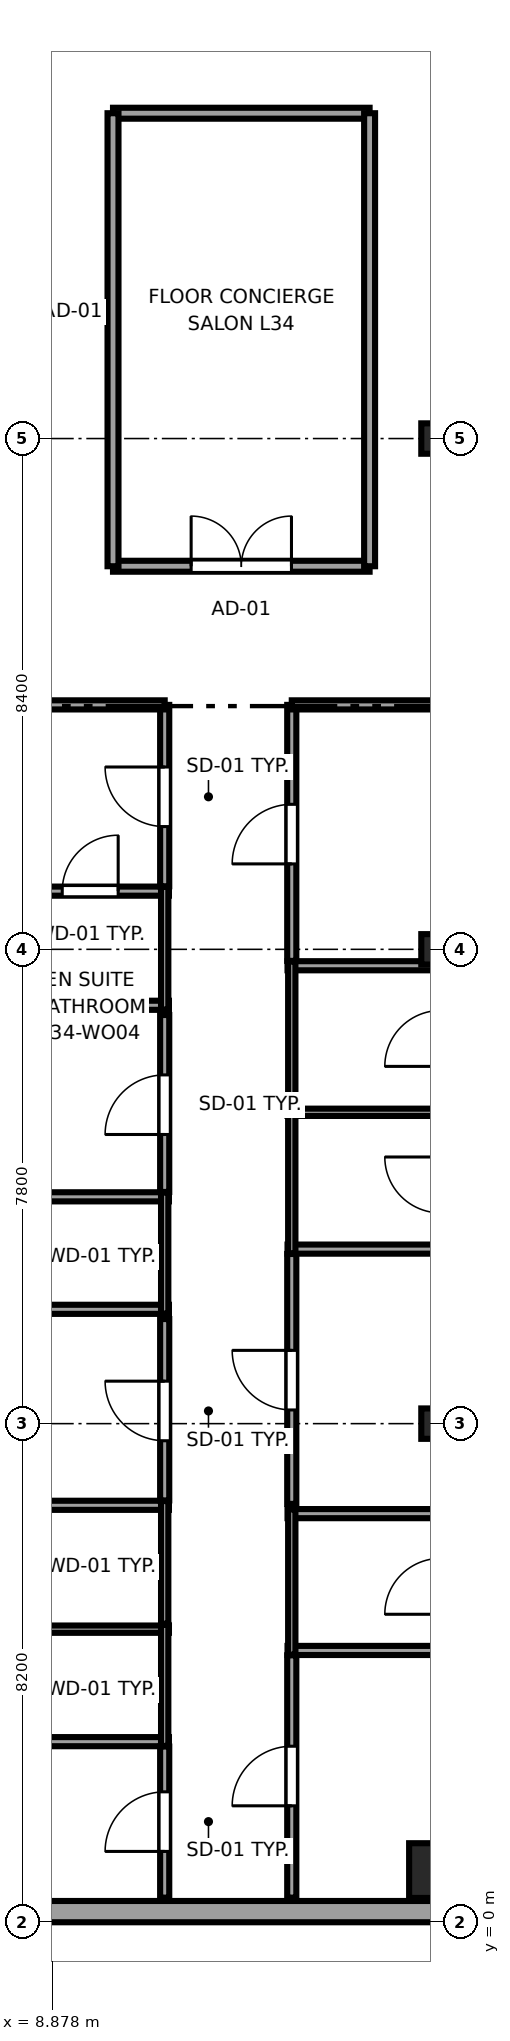
"""IFC4 building model, lengths in metres.
Left out: names, types, materials, properties, quantities, classifications, styles, units other than length and angle.
Written with IfcOpenShell. Run it as: python <this file> out.ifc"""

import sys

from ifc_helpers import new_model, si_unit, direction, frame, frame_2d, origin, origin_2d, place, context, subcontext, project, spatial, rectangle, i_section, extrude, source, transform, mapped, element, fill, save


model = new_model("IFC4")
c1 = context("Model", 3, precision=1e-05, world=origin(), true_north=direction((0.0, 1.0)))
c2 = subcontext(c1, "Body", "Model", "MODEL_VIEW")
j1 = project(units=[si_unit("LENGTHUNIT", "METRE"), si_unit("PLANEANGLEUNIT", "RADIAN")], contexts=[c1])
p1 = place(None, origin())
s1 = spatial("IfcSite", under=j1, at=p1, CompositionType="ELEMENT")
p2 = place(p1, origin())
s2 = spatial("IfcBuilding", under=s1, at=p2, CompositionType="ELEMENT")
p3 = place(p2, frame((0.0, 0.0, 132.85)))
s3 = spatial("IfcBuildingStorey", under=s2, at=p3, CompositionType="ELEMENT", Elevation=132.85)
m1 = source(origin(), c2, "Body", "SweptSolid", [
    extrude(rectangle(XDim=0.9, YDim=0.9, at=origin_2d()), origin(), (0.0, 0.0, 1.0), 3.55),
])
p4 = place(p3, frame((15.2, 0.85, 0.0), z_axis=(0.0, 0.0, 1.0), x_axis=(1.0, 0.0, 0.0)))
e1 = element("IfcColumn", 1, at=p4, inside=s3, PredefinedType="COLUMN", context=c2, shape_type="MappedRepresentation", body=[
    mapped(m1, transform((0.0, 0.0, 0.0), x_axis=(1.0, 0.0, 0.0), y_axis=(0.0, 1.0, 0.0), z_axis=(0.0, 0.0, 1.0), scale=1.0)),
])
m2 = source(origin(), c2, "Body", "SweptSolid", [
    extrude(i_section(OverallWidth=0.5, OverallDepth=0.5, WebThickness=0.022, FlangeThickness=0.034, at=origin_2d()), origin(), (0.0, 0.0, 1.0), 3.55),
])
for number, where, z_axis, x_axis in (
    (2, (15.2, 8.2, 0.0), (0.0, 0.0, 1.0), (1.0, 0.0, 0.0)),
    (3, (15.2, 16.0, 0.0), (0.0, 0.0, 1.0), (1.0, 0.0, 0.0)),
    (4, (15.2, 24.4, 0.0), (0.0, 0.0, 1.0), (1.0, 0.0, 0.0)),
):
    element("IfcColumn", number, at=place(p3, frame(where, z_axis=z_axis, x_axis=x_axis)), inside=s3, PredefinedType="COLUMN", context=c2, shape_type="MappedRepresentation", body=[
        mapped(m2, transform((0.0, 0.0, 0.0), x_axis=(1.0, 0.0, 0.0), y_axis=(0.0, 1.0, 0.0), z_axis=(0.0, 0.0, 1.0), scale=1.0)),
    ])
p5 = place(p3, frame((4.617, 0.175, 0.0), z_axis=(0.0, 0.0, 1.0), x_axis=(1.0, 0.0, 0.0)))
e5 = element("IfcWall", 5, at=p5, inside=s3, PredefinedType="SOLIDWALL", context=c2, shape_type="SweptSolid", body=[
    extrude(rectangle(XDim=18.008, YDim=0.35, at=frame_2d((9.004, 0.0))), origin(), (0.0, 0.0, 1.0), 3.37),
])
p6 = place(p5, frame((14.332, 0.0, 0.68)))
e6 = element("IfcOpeningElement", 6, at=p6, cuts=e5, PredefinedType="OPENING", context=c2, shape_type="SweptSolid", body=[
    extrude(rectangle(XDim=1.95, YDim=1.82, at=frame_2d((0.975, 0.91))), frame((0.0, 0.185, 0.0), z_axis=(0.0, -1.0, 0.0), x_axis=(1.0, 0.0, 0.0)), (0.0, 0.0, 1.0), 0.37),
])
p7 = place(p5, frame((2.391, 0.0, 0.62)))
e7 = element("IfcOpeningElement", 7, at=p7, cuts=e5, PredefinedType="OPENING", context=c2, shape_type="SweptSolid", body=[
    extrude(rectangle(XDim=1.5, YDim=1.55, at=frame_2d((0.75, 0.775))), frame((0.0, 0.185, 0.0), z_axis=(0.0, -1.0, 0.0), x_axis=(1.0, 0.0, 0.0)), (0.0, 0.0, 1.0), 0.37),
])
p8 = place(p3, frame((8.21, 2.97, 0.0), z_axis=(0.0, 0.0, 1.0), x_axis=(1.0, 0.0, 0.0)))
e8 = element("IfcWall", 8, at=p8, inside=s3, PredefinedType="PARTITIONING", context=c2, shape_type="SweptSolid", body=[
    extrude(rectangle(XDim=2.59, YDim=0.15, at=frame_2d((1.295, 0.0))), origin(), (0.0, 0.0, 1.0), 3.37),
])
p9 = place(p3, frame((8.21, 4.82, 0.0), z_axis=(0.0, 0.0, 1.0), x_axis=(1.0, 0.0, 0.0)))
e9 = element("IfcWall", 9, at=p9, inside=s3, PredefinedType="PLUMBINGWALL", context=c2, shape_type="SweptSolid", body=[
    extrude(rectangle(XDim=2.59, YDim=0.12, at=frame_2d((1.295, 0.0))), origin(), (0.0, 0.0, 1.0), 3.37),
])
p10 = place(p3, frame((10.73, 2.9, 0.0), z_axis=(0.0, 0.0, 1.0), x_axis=(0.0, 1.0, 0.0)))
e10 = element("IfcWall", 10, at=p10, inside=s3, PredefinedType="PLUMBINGWALL", context=c2, shape_type="SweptSolid", body=[
    extrude(rectangle(XDim=1.99, YDim=0.12, at=frame_2d((0.995, 0.0))), origin(), (0.0, 0.0, 1.0), 3.37),
])
p11 = place(p3, frame((8.21, 6.857, 0.0), z_axis=(0.0, 0.0, 1.0), x_axis=(1.0, 0.0, 0.0)))
e11 = element("IfcWall", 11, at=p11, inside=s3, PredefinedType="PARTITIONING", context=c2, shape_type="SweptSolid", body=[
    extrude(rectangle(XDim=2.59, YDim=0.15, at=frame_2d((1.295, 0.0))), origin(), (0.0, 0.0, 1.0), 3.37),
])
p12 = place(p3, frame((10.73, 4.91, 0.0), z_axis=(0.0, 0.0, 1.0), x_axis=(0.0, 1.0, 0.0)))
e12 = element("IfcWall", 12, at=p12, inside=s3, PredefinedType="PLUMBINGWALL", context=c2, shape_type="SweptSolid", body=[
    extrude(rectangle(XDim=2.017, YDim=0.12, at=frame_2d((1.009, 0.0))), origin(), (0.0, 0.0, 1.0), 3.37),
])
p13 = place(p3, frame((0.405, 10.08, 0.0), z_axis=(0.0, 0.0, 1.0), x_axis=(1.0, 0.0, 0.0)))
e13 = element("IfcWall", 13, at=p13, inside=s3, PredefinedType="PARTITIONING", context=c2, shape_type="SweptSolid", body=[
    extrude(rectangle(XDim=10.395, YDim=0.15, at=frame_2d((5.198, 0.0))), origin(), (0.0, 0.0, 1.0), 3.37),
])
p14 = place(p3, frame((8.21, 11.93, 0.0), z_axis=(0.0, 0.0, 1.0), x_axis=(1.0, 0.0, 0.0)))
e14 = element("IfcWall", 14, at=p14, inside=s3, PredefinedType="PARTITIONING", context=c2, shape_type="SweptSolid", body=[
    extrude(rectangle(XDim=2.59, YDim=0.15, at=frame_2d((1.295, 0.0))), origin(), (0.0, 0.0, 1.0), 3.37),
])
p15 = place(p3, frame((10.73, 10.01, 0.0), z_axis=(0.0, 0.0, 1.0), x_axis=(0.0, 1.0, 0.0)))
e15 = element("IfcWall", 15, at=p15, inside=s3, PredefinedType="PLUMBINGWALL", context=c2, shape_type="SweptSolid", body=[
    extrude(rectangle(XDim=1.99, YDim=0.12, at=frame_2d((0.995, 0.0))), origin(), (0.0, 0.0, 1.0), 3.37),
])
p16 = place(p3, frame((0.405, 15.08, 0.0), z_axis=(0.0, 0.0, 1.0), x_axis=(1.0, 0.0, 0.0)))
e16 = element("IfcWall", 16, at=p16, inside=s3, PredefinedType="PARTITIONING", context=c2, shape_type="SweptSolid", body=[
    extrude(rectangle(XDim=10.395, YDim=0.15, at=frame_2d((5.198, 0.0))), origin(), (0.0, 0.0, 1.0), 3.37),
])
p17 = place(p3, frame((8.21, 16.957, 0.0), z_axis=(0.0, 0.0, 1.0), x_axis=(1.0, 0.0, 0.0)))
e17 = element("IfcWall", 17, at=p17, inside=s3, PredefinedType="PARTITIONING", context=c2, shape_type="SweptSolid", body=[
    extrude(rectangle(XDim=2.59, YDim=0.15, at=frame_2d((1.295, 0.0))), origin(), (0.0, 0.0, 1.0), 3.37),
])
p18 = place(p17, frame((0.835, 0.0, 0.0)))
e18 = element("IfcOpeningElement", 18, at=p18, cuts=e17, PredefinedType="OPENING", context=c2, shape_type="SweptSolid", body=[
    extrude(rectangle(XDim=0.92, YDim=2.01, at=frame_2d((0.46, 1.005))), frame((0.0, 0.085, 0.0), z_axis=(0.0, -1.0, 0.0), x_axis=(1.0, 0.0, 0.0)), (0.0, 0.0, 1.0), 0.17),
])
p19 = place(p3, frame((10.73, 15.01, 0.0), z_axis=(0.0, 0.0, 1.0), x_axis=(0.0, 1.0, 0.0)))
e19 = element("IfcWall", 19, at=p19, inside=s3, PredefinedType="PLUMBINGWALL", context=c2, shape_type="SweptSolid", body=[
    extrude(rectangle(XDim=2.017, YDim=0.12, at=frame_2d((1.009, 0.0))), origin(), (0.0, 0.0, 1.0), 3.37),
])
for number, where, z_axis, x_axis in (
    (20, (12.75, 4.47, 0.0), (0.0, 0.0, 1.0), (1.0, 0.0, 0.0)),
    (21, (12.75, 6.72, 0.0), (0.0, 0.0, 1.0), (1.0, 0.0, 0.0)),
):
    element("IfcWall", number, at=place(p3, frame(where, z_axis=z_axis, x_axis=x_axis)), inside=s3, PredefinedType="PARTITIONING", context=c2, shape_type="SweptSolid", body=[
        extrude(rectangle(XDim=2.59, YDim=0.15, at=frame_2d((1.295, 0.0))), origin(), (0.0, 0.0, 1.0), 3.37),
    ])
p20 = place(p3, frame((12.82, 4.4, 0.0), z_axis=(0.0, 0.0, 1.0), x_axis=(0.0, 1.0, 0.0)))
e22 = element("IfcWall", 22, at=p20, inside=s3, PredefinedType="PLUMBINGWALL", context=c2, shape_type="SweptSolid", body=[
    extrude(rectangle(XDim=2.39, YDim=0.12, at=frame_2d((1.195, 0.0))), origin(), (0.0, 0.0, 1.0), 3.37),
])
p21 = place(p3, frame((12.75, 11.07, 0.0), z_axis=(0.0, 0.0, 1.0), x_axis=(1.0, 0.0, 0.0)))
e23 = element("IfcWall", 23, at=p21, inside=s3, PredefinedType="PARTITIONING", context=c2, shape_type="SweptSolid", body=[
    extrude(rectangle(XDim=2.59, YDim=0.15, at=frame_2d((1.295, 0.0))), origin(), (0.0, 0.0, 1.0), 3.37),
])
p22 = place(p3, frame((12.75, 13.32, 0.0), z_axis=(0.0, 0.0, 1.0), x_axis=(1.0, 0.0, 0.0)))
e24 = element("IfcWall", 24, at=p22, inside=s3, PredefinedType="PLUMBINGWALL", context=c2, shape_type="SweptSolid", body=[
    extrude(rectangle(XDim=2.59, YDim=0.12, at=frame_2d((1.295, 0.0))), origin(), (0.0, 0.0, 1.0), 3.37),
])
p23 = place(p3, frame((12.82, 11.0, 0.0), z_axis=(0.0, 0.0, 1.0), x_axis=(0.0, 1.0, 0.0)))
e25 = element("IfcWall", 25, at=p23, inside=s3, PredefinedType="PLUMBINGWALL", context=c2, shape_type="SweptSolid", body=[
    extrude(rectangle(XDim=2.39, YDim=0.12, at=frame_2d((1.195, 0.0))), origin(), (0.0, 0.0, 1.0), 3.37),
])
p24 = place(p3, frame((12.75, 15.73, 0.0), z_axis=(0.0, 0.0, 1.0), x_axis=(1.0, 0.0, 0.0)))
e26 = element("IfcWall", 26, at=p24, inside=s3, PredefinedType="PARTITIONING", context=c2, shape_type="SweptSolid", body=[
    extrude(rectangle(XDim=2.59, YDim=0.15, at=frame_2d((1.295, 0.0))), origin(), (0.0, 0.0, 1.0), 3.37),
])
p25 = place(p3, frame((12.82, 13.41, 0.0), z_axis=(0.0, 0.0, 1.0), x_axis=(0.0, 1.0, 0.0)))
e27 = element("IfcWall", 27, at=p25, inside=s3, PredefinedType="PLUMBINGWALL", context=c2, shape_type="SweptSolid", body=[
    extrude(rectangle(XDim=2.39, YDim=0.12, at=frame_2d((1.195, 0.0))), origin(), (0.0, 0.0, 1.0), 3.37),
])
p26 = place(p3, frame((10.73, 0.405, 0.0), z_axis=(0.0, 0.0, 1.0), x_axis=(0.0, 1.0, 0.0)))
e28 = element("IfcWall", 28, at=p26, inside=s3, PredefinedType="PARTITIONING", context=c2, shape_type="SweptSolid", body=[
    extrude(rectangle(XDim=2.485, YDim=0.15, at=frame_2d((1.242, 0.0))), origin(), (0.0, 0.0, 1.0), 3.37),
])
p27 = place(p26, frame((0.76, 0.0, 0.0)))
e29 = element("IfcOpeningElement", 29, at=p27, cuts=e28, PredefinedType="OPENING", context=c2, shape_type="SweptSolid", body=[
    extrude(rectangle(XDim=0.98, YDim=2.12, at=frame_2d((0.49, 1.06))), frame((0.0, 0.085, 0.0), z_axis=(0.0, -1.0, 0.0), x_axis=(1.0, 0.0, 0.0)), (0.0, 0.0, 1.0), 0.17),
])
p28 = place(p3, frame((10.73, 6.937, 0.0), z_axis=(0.0, 0.0, 1.0), x_axis=(0.0, 1.0, 0.0)))
e30 = element("IfcWall", 30, at=p28, inside=s3, PredefinedType="PARTITIONING", context=c2, shape_type="SweptSolid", body=[
    extrude(rectangle(XDim=2.983, YDim=0.15, at=frame_2d((1.491, 0.0))), origin(), (0.0, 0.0, 1.0), 3.37),
])
p29 = place(p28, frame((0.981, 0.0, 0.0)))
e31 = element("IfcOpeningElement", 31, at=p29, cuts=e30, PredefinedType="OPENING", context=c2, shape_type="SweptSolid", body=[
    extrude(rectangle(XDim=0.98, YDim=2.12, at=frame_2d((0.49, 1.06))), frame((0.0, 0.085, 0.0), z_axis=(0.0, -1.0, 0.0), x_axis=(1.0, 0.0, 0.0)), (0.0, 0.0, 1.0), 0.17),
])
p30 = place(p3, frame((10.73, 12.01, 0.0), z_axis=(0.0, 0.0, 1.0), x_axis=(0.0, 1.0, 0.0)))
e32 = element("IfcWall", 32, at=p30, inside=s3, PredefinedType="PARTITIONING", context=c2, shape_type="SweptSolid", body=[
    extrude(rectangle(XDim=2.91, YDim=0.15, at=frame_2d((1.455, 0.0))), origin(), (0.0, 0.0, 1.0), 3.37),
])
p31 = place(p30, frame((0.945, 0.0, 0.0)))
e33 = element("IfcOpeningElement", 33, at=p31, cuts=e32, PredefinedType="OPENING", context=c2, shape_type="SweptSolid", body=[
    extrude(rectangle(XDim=0.98, YDim=2.12, at=frame_2d((0.49, 1.06))), frame((0.0, 0.085, 0.0), z_axis=(0.0, -1.0, 0.0), x_axis=(1.0, 0.0, 0.0)), (0.0, 0.0, 1.0), 0.17),
])
p32 = place(p3, frame((10.73, 17.037, 0.0), z_axis=(0.0, 0.0, 1.0), x_axis=(0.0, 1.0, 0.0)))
e34 = element("IfcWall", 34, at=p32, inside=s3, PredefinedType="PARTITIONING", context=c2, shape_type="SweptSolid", body=[
    extrude(rectangle(XDim=2.983, YDim=0.15, at=frame_2d((1.491, 0.0))), origin(), (0.0, 0.0, 1.0), 3.37),
])
p33 = place(p32, frame((0.981, 0.0, 0.0)))
e35 = element("IfcOpeningElement", 35, at=p33, cuts=e34, PredefinedType="OPENING", context=c2, shape_type="SweptSolid", body=[
    extrude(rectangle(XDim=0.98, YDim=2.12, at=frame_2d((0.49, 1.06))), frame((0.0, 0.085, 0.0), z_axis=(0.0, -1.0, 0.0), x_axis=(1.0, 0.0, 0.0)), (0.0, 0.0, 1.0), 0.17),
])
p34 = place(p3, frame((0.405, 20.02, 0.0), z_axis=(0.0, 0.0, 1.0), x_axis=(1.0, 0.0, 0.0)))
e36 = element("IfcWall", 36, at=p34, inside=s3, PredefinedType="PARTITIONING", context=c2, shape_type="SweptSolid", body=[
    extrude(rectangle(XDim=10.325, YDim=0.15, at=frame_2d((5.163, 0.0))), origin(), (0.0, 0.0, 1.0), 3.37),
])
p35 = place(p3, frame((12.82, 0.405, 0.0), z_axis=(0.0, 0.0, 1.0), x_axis=(0.0, 1.0, 0.0)))
e37 = element("IfcWall", 37, at=p35, inside=s3, PredefinedType="PARTITIONING", context=c2, shape_type="SweptSolid", body=[
    extrude(rectangle(XDim=3.985, YDim=0.15, at=frame_2d((1.992, 0.0))), origin(), (0.0, 0.0, 1.0), 3.37),
])
p36 = place(p35, frame((1.51, 0.0, 0.0)))
e38 = element("IfcOpeningElement", 38, at=p36, cuts=e37, PredefinedType="OPENING", context=c2, shape_type="SweptSolid", body=[
    extrude(rectangle(XDim=0.98, YDim=2.12, at=frame_2d((0.49, 1.06))), frame((0.0, 0.085, 0.0), z_axis=(0.0, -1.0, 0.0), x_axis=(1.0, 0.0, 0.0)), (0.0, 0.0, 1.0), 0.17),
])
p37 = place(p3, frame((12.82, 6.88, 0.0), z_axis=(0.0, 0.0, 1.0), x_axis=(0.0, 1.0, 0.0)))
e39 = element("IfcWall", 39, at=p37, inside=s3, PredefinedType="PARTITIONING", context=c2, shape_type="SweptSolid", body=[
    extrude(rectangle(XDim=4.11, YDim=0.15, at=frame_2d((2.055, 0.0))), origin(), (0.0, 0.0, 1.0), 3.37),
])
p38 = place(p37, frame((1.545, 0.0, 0.0)))
e40 = element("IfcOpeningElement", 40, at=p38, cuts=e39, PredefinedType="OPENING", context=c2, shape_type="SweptSolid", body=[
    extrude(rectangle(XDim=0.98, YDim=2.12, at=frame_2d((0.49, 1.06))), frame((0.0, 0.085, 0.0), z_axis=(0.0, -1.0, 0.0), x_axis=(1.0, 0.0, 0.0)), (0.0, 0.0, 1.0), 0.17),
])
p39 = place(p3, frame((12.82, 15.81, 0.0), z_axis=(0.0, 0.0, 1.0), x_axis=(0.0, 1.0, 0.0)))
e41 = element("IfcWall", 41, at=p39, inside=s3, PredefinedType="PARTITIONING", context=c2, shape_type="SweptSolid", body=[
    extrude(rectangle(XDim=4.21, YDim=0.15, at=frame_2d((2.105, 0.0))), origin(), (0.0, 0.0, 1.0), 3.37),
])
p40 = place(p39, frame((1.595, 0.0, 0.0)))
e42 = element("IfcOpeningElement", 42, at=p40, cuts=e41, PredefinedType="OPENING", context=c2, shape_type="SweptSolid", body=[
    extrude(rectangle(XDim=0.98, YDim=2.12, at=frame_2d((0.49, 1.06))), frame((0.0, 0.085, 0.0), z_axis=(0.0, -1.0, 0.0), x_axis=(1.0, 0.0, 0.0)), (0.0, 0.0, 1.0), 0.17),
])
p41 = place(p3, frame((12.82, 20.02, 0.0), z_axis=(0.0, 0.0, 1.0), x_axis=(1.0, 0.0, 0.0)))
e43 = element("IfcWall", 43, at=p41, inside=s3, PredefinedType="PARTITIONING", context=c2, shape_type="SweptSolid", body=[
    extrude(rectangle(XDim=9.53, YDim=0.15, at=frame_2d((4.765, 0.0))), origin(), (0.0, 0.0, 1.0), 2.954),
])
p42 = place(p3, frame((9.88, 22.3, 0.0), z_axis=(0.0, 0.0, 1.0), x_axis=(1.0, 0.0, 0.0)))
e44 = element("IfcWall", 44, at=p42, inside=s3, PredefinedType="PARTITIONING", context=c2, shape_type="SweptSolid", body=[
    extrude(rectangle(XDim=4.22, YDim=0.18, at=frame_2d((2.11, 0.0))), origin(), (0.0, 0.0, 1.0), 3.37),
])
p43 = place(p42, frame((1.285, 0.0, 0.0)))
e45 = element("IfcOpeningElement", 45, at=p43, cuts=e44, PredefinedType="OPENING", context=c2, shape_type="SweptSolid", body=[
    extrude(rectangle(XDim=1.65, YDim=2.15, at=frame_2d((0.825, 1.075))), frame((0.0, 0.1, 0.0), z_axis=(0.0, -1.0, 0.0), x_axis=(1.0, 0.0, 0.0)), (0.0, 0.0, 1.0), 0.2),
])
p44 = place(p3, frame((9.88, 29.75, 0.0), z_axis=(0.0, 0.0, 1.0), x_axis=(1.0, 0.0, 0.0)))
e46 = element("IfcWall", 46, at=p44, inside=s3, PredefinedType="PARTITIONING", context=c2, shape_type="SweptSolid", body=[
    extrude(rectangle(XDim=4.22, YDim=0.18, at=frame_2d((2.11, 0.0))), origin(), (0.0, 0.0, 1.0), 3.37),
])
for number, where, z_axis, x_axis in (
    (47, (9.88, 22.3, 0.0), (0.0, 0.0, 1.0), (0.0, 1.0, 0.0)),
    (48, (14.1, 22.3, 0.0), (0.0, 0.0, 1.0), (0.0, 1.0, 0.0)),
):
    element("IfcWall", number, at=place(p3, frame(where, z_axis=z_axis, x_axis=x_axis)), inside=s3, PredefinedType="PARTITIONING", context=c2, shape_type="SweptSolid", body=[
        extrude(rectangle(XDim=7.45, YDim=0.18, at=frame_2d((3.725, 0.0))), origin(), (0.0, 0.0, 1.0), 3.37),
    ])
m3 = source(origin(), c2, "Body", "SweptSolid", [
    extrude(rectangle(XDim=0.92, YDim=2.01, at=frame_2d((0.46, 1.005))), frame((0.0, 0.025, 0.0), z_axis=(0.0, -1.0, 0.0), x_axis=(1.0, 0.0, 0.0)), (0.0, 0.0, 1.0), 0.05),
])
p45 = place(p18, origin())
e49 = element("IfcDoor", 49, at=p45, inside=s3, OperationType="SINGLE_SWING_RIGHT", PredefinedType="DOOR", context=c2, shape_type="MappedRepresentation", body=[
    mapped(m3, transform((0.0, 0.0, 0.0), x_axis=(1.0, 0.0, 0.0), y_axis=(0.0, 1.0, 0.0), z_axis=(0.0, 0.0, 1.0), scale=1.0)),
])
fill(e18, e49)
m4 = source(origin(), c2, "Body", "SweptSolid", [
    extrude(rectangle(XDim=0.98, YDim=2.12, at=frame_2d((0.49, 1.06))), frame((0.0, 0.025, 0.0), z_axis=(0.0, -1.0, 0.0), x_axis=(1.0, 0.0, 0.0)), (0.0, 0.0, 1.0), 0.05),
])
p46 = place(p27, origin())
e50 = element("IfcDoor", 50, at=p46, inside=s3, OperationType="SINGLE_SWING_LEFT", PredefinedType="DOOR", context=c2, shape_type="MappedRepresentation", body=[
    mapped(m4, transform((0.0, 0.0, 0.0), x_axis=(1.0, 0.0, 0.0), y_axis=(0.0, 1.0, 0.0), z_axis=(0.0, 0.0, 1.0), scale=1.0)),
])
fill(e29, e50)
p47 = place(p29, origin())
e51 = element("IfcDoor", 51, at=p47, inside=s3, OperationType="SINGLE_SWING_RIGHT", PredefinedType="DOOR", context=c2, shape_type="MappedRepresentation", body=[
    mapped(m4, transform((0.0, 0.0, 0.0), x_axis=(1.0, 0.0, 0.0), y_axis=(0.0, 1.0, 0.0), z_axis=(0.0, 0.0, 1.0), scale=1.0)),
])
fill(e31, e51)
p48 = place(p31, origin())
e52 = element("IfcDoor", 52, at=p48, inside=s3, OperationType="SINGLE_SWING_LEFT", PredefinedType="DOOR", context=c2, shape_type="MappedRepresentation", body=[
    mapped(m4, transform((0.0, 0.0, 0.0), x_axis=(1.0, 0.0, 0.0), y_axis=(0.0, 1.0, 0.0), z_axis=(0.0, 0.0, 1.0), scale=1.0)),
])
fill(e33, e52)
p49 = place(p33, origin())
e53 = element("IfcDoor", 53, at=p49, inside=s3, OperationType="SINGLE_SWING_RIGHT", PredefinedType="DOOR", context=c2, shape_type="MappedRepresentation", body=[
    mapped(m4, transform((0.0, 0.0, 0.0), x_axis=(1.0, 0.0, 0.0), y_axis=(0.0, 1.0, 0.0), z_axis=(0.0, 0.0, 1.0), scale=1.0)),
])
fill(e35, e53)
p50 = place(p36, origin())
e54 = element("IfcDoor", 54, at=p50, inside=s3, OperationType="SINGLE_SWING_LEFT", PredefinedType="DOOR", context=c2, shape_type="MappedRepresentation", body=[
    mapped(m4, transform((0.0, 0.0, 0.0), x_axis=(1.0, 0.0, 0.0), y_axis=(0.0, 1.0, 0.0), z_axis=(0.0, 0.0, 1.0), scale=1.0)),
])
fill(e38, e54)
p51 = place(p38, origin())
e55 = element("IfcDoor", 55, at=p51, inside=s3, OperationType="SINGLE_SWING_RIGHT", PredefinedType="DOOR", context=c2, shape_type="MappedRepresentation", body=[
    mapped(m4, transform((0.0, 0.0, 0.0), x_axis=(1.0, 0.0, 0.0), y_axis=(0.0, 1.0, 0.0), z_axis=(0.0, 0.0, 1.0), scale=1.0)),
])
fill(e40, e55)
p52 = place(p40, origin())
e56 = element("IfcDoor", 56, at=p52, inside=s3, OperationType="SINGLE_SWING_LEFT", PredefinedType="DOOR", context=c2, shape_type="MappedRepresentation", body=[
    mapped(m4, transform((0.0, 0.0, 0.0), x_axis=(1.0, 0.0, 0.0), y_axis=(0.0, 1.0, 0.0), z_axis=(0.0, 0.0, 1.0), scale=1.0)),
])
fill(e42, e56)
m5 = source(origin(), c2, "Body", "SweptSolid", [
    extrude(rectangle(XDim=1.65, YDim=2.15, at=frame_2d((0.825, 1.075))), frame((0.0, 0.025, 0.0), z_axis=(0.0, -1.0, 0.0), x_axis=(1.0, 0.0, 0.0)), (0.0, 0.0, 1.0), 0.05),
])
p53 = place(p43, origin())
e57 = element("IfcDoor", 57, at=p53, inside=s3, OperationType="DOUBLE_DOOR_SINGLE_SWING", PredefinedType="DOOR", context=c2, shape_type="MappedRepresentation", body=[
    mapped(m5, transform((0.0, 0.0, 0.0), x_axis=(1.0, 0.0, 0.0), y_axis=(0.0, 1.0, 0.0), z_axis=(0.0, 0.0, 1.0), scale=1.0)),
])
fill(e45, e57)
save(model, sys.argv[1])
